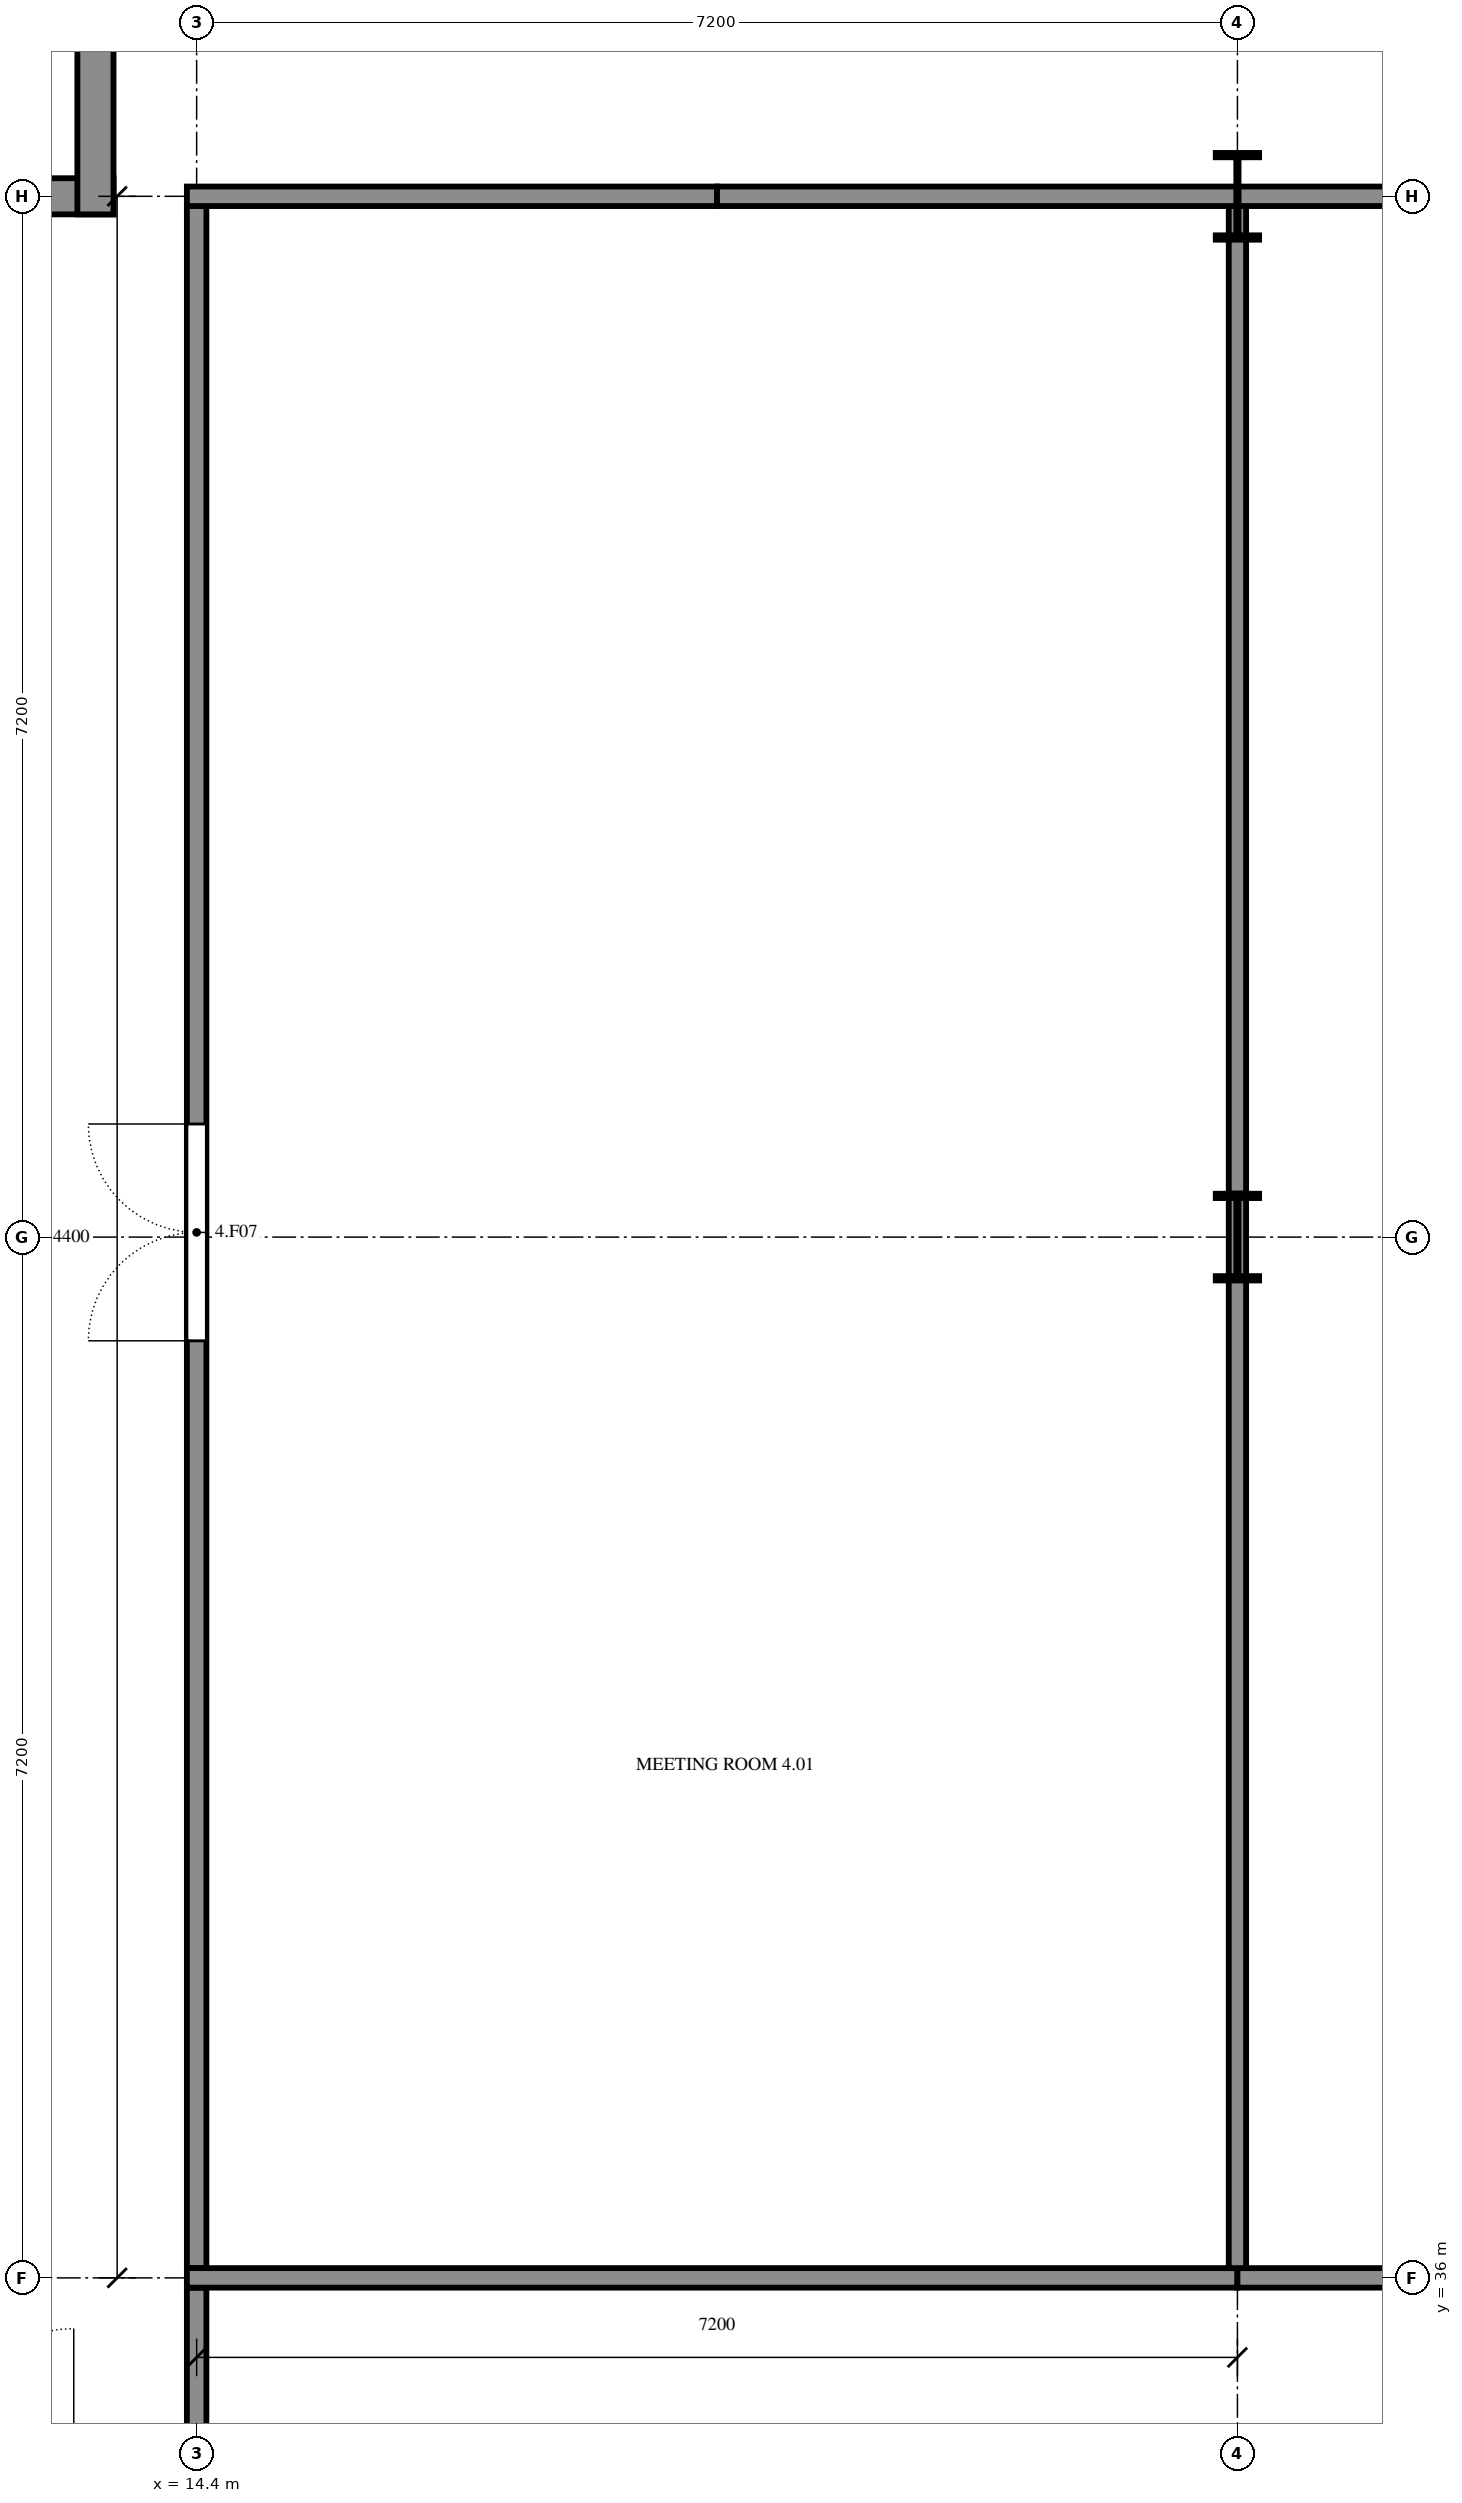
"""IFC4 building model, lengths in metres.
Left out: names, types, materials, properties, quantities, classifications, styles, units other than length and angle.
Written with IfcOpenShell. Run it as: python <this file> out.ifc"""

import sys

from ifc_helpers import new_model, si_unit, direction, frame, frame_2d, origin, origin_2d, place, context, subcontext, project, spatial, rectangle, i_section, extrude, element, fill, save


model = new_model("IFC4")
c1 = context("Model", 3, precision=1e-05, world=origin(), true_north=direction((0.0, 1.0)))
c2 = subcontext(c1, "Body", "Model", "MODEL_VIEW")
j1 = project(units=[si_unit("LENGTHUNIT", "METRE"), si_unit("PLANEANGLEUNIT", "RADIAN")], contexts=[c1])
p1 = place(None, origin())
s1 = spatial("IfcSite", under=j1, at=p1, CompositionType="ELEMENT")
p2 = place(p1, origin())
s2 = spatial("IfcBuilding", under=s1, at=p2, CompositionType="ELEMENT")
p3 = place(p2, frame((0.0, 0.0, 14.4)))
s3 = spatial("IfcBuildingStorey", under=s2, at=p3, CompositionType="ELEMENT", Elevation=14.4)
for number, where, z_axis, x_axis in (
    (1, (21.6, 43.2, 0.0), (0.0, 0.0, 1.0), (1.0, 0.0, 0.0)),
    (2, (21.6, 50.4, 0.0), (0.0, 0.0, 1.0), (1.0, 0.0, 0.0)),
):
    element("IfcColumn", number, at=place(p3, frame(where, z_axis=z_axis, x_axis=x_axis)), inside=s3, PredefinedType="COLUMN", context=c2, shape_type="SweptSolid", body=[
        extrude(i_section(OverallWidth=0.3, OverallDepth=0.6, WebThickness=0.015, FlangeThickness=0.03, FilletRadius=0.027, at=origin_2d()), origin(), (0.0, 0.0, 1.0), 3.6),
    ])
p4 = place(p3, frame((11.725, 50.4, 0.0), z_axis=(0.0, 0.0, 1.0), x_axis=(1.0, 0.0, 0.0)))
e3 = element("IfcWall", 3, at=p4, inside=s3, PredefinedType="SHEAR", context=c2, shape_type="SweptSolid", body=[
    extrude(rectangle(XDim=2.1, YDim=0.25, at=frame_2d((1.05, 0.0))), origin(), (0.0, 0.0, 1.0), 3.6),
])
p5 = place(p3, frame((13.7, 50.275, 0.0), z_axis=(0.0, 0.0, 1.0), x_axis=(0.0, 1.0, 0.0)))
e4 = element("IfcWall", 4, at=p5, inside=s3, PredefinedType="SHEAR", context=c2, shape_type="SweptSolid", body=[
    extrude(rectangle(XDim=5.25, YDim=0.25, at=frame_2d((2.625, 0.0))), origin(), (0.0, 0.0, 1.0), 3.6),
])
p6 = place(p5, frame((1.975, 0.0, 0.0)))
e5 = element("IfcOpeningElement", 5, at=p6, cuts=e4, PredefinedType="OPENING", context=c2, shape_type="SweptSolid", body=[
    extrude(rectangle(XDim=1.2, YDim=2.4, at=frame_2d((0.6, 1.2))), frame((0.0, 0.135, 0.0), z_axis=(0.0, -1.0, 0.0), x_axis=(1.0, 0.0, 0.0)), (0.0, 0.0, 1.0), 0.27),
])
p7 = place(p3, frame((14.4, 50.333, 0.0), z_axis=(0.0, 0.0, 1.0), x_axis=(0.0, -1.0, 0.0)))
e6 = element("IfcWall", 6, at=p7, inside=s3, PredefinedType="PARTITIONING", context=c2, shape_type="SweptSolid", body=[
    extrude(rectangle(XDim=14.265, YDim=0.135, at=frame_2d((7.133, 0.0))), origin(), (0.0, 0.0, 1.0), 3.12),
])
p8 = place(p7, frame((6.35, 0.0, 0.0)))
e7 = element("IfcOpeningElement", 7, at=p8, cuts=e6, PredefinedType="OPENING", context=c2, shape_type="SweptSolid", body=[
    extrude(rectangle(XDim=1.5, YDim=2.1, at=frame_2d((0.75, 1.05))), frame((0.0, 0.077, 0.0), z_axis=(0.0, -1.0, 0.0), x_axis=(1.0, 0.0, 0.0)), (0.0, 0.0, 1.0), 0.155),
])
p9 = place(p3, frame((14.4, 35.933, 0.0), z_axis=(0.0, 0.0, 1.0), x_axis=(0.0, -1.0, 0.0)))
e8 = element("IfcWall", 8, at=p9, inside=s3, PredefinedType="PARTITIONING", context=c2, shape_type="SweptSolid", body=[
    extrude(rectangle(XDim=0.973, YDim=0.135, at=frame_2d((0.486, 0.0))), origin(), (0.0, 0.0, 1.0), 3.219),
])
p10 = place(p3, frame((18.0, 50.4, 0.0), z_axis=(0.0, 0.0, 1.0), x_axis=(-1.0, 0.0, 0.0)))
e9 = element("IfcWall", 9, at=p10, inside=s3, PredefinedType="PARTITIONING", context=c2, shape_type="SweptSolid", body=[
    extrude(rectangle(XDim=3.667, YDim=0.135, at=frame_2d((1.834, 0.0))), origin(), (0.0, 0.0, 1.0), 3.09),
])
p11 = place(p3, frame((21.6, 50.333, 0.0), z_axis=(0.0, 0.0, 1.0), x_axis=(0.0, -1.0, 0.0)))
e10 = element("IfcWall", 10, at=p11, inside=s3, PredefinedType="MOVABLE", context=c2, shape_type="SweptSolid", body=[
    extrude(rectangle(XDim=6.833, YDim=0.12, at=frame_2d((3.416, 0.0))), origin(), (0.0, 0.0, 1.0), 3.12),
])
p12 = place(p3, frame((21.6, 36.0, 0.0), z_axis=(0.0, 0.0, 1.0), x_axis=(-1.0, 0.0, 0.0)))
e11 = element("IfcWall", 11, at=p12, inside=s3, PredefinedType="PARTITIONING", context=c2, shape_type="SweptSolid", body=[
    extrude(rectangle(XDim=7.268, YDim=0.135, at=frame_2d((3.634, 0.0))), origin(), (0.0, 0.0, 1.0), 2.82),
])
p13 = place(p3, frame((18.0, 50.4, 0.0), z_axis=(0.0, 0.0, 1.0), x_axis=(1.0, 0.0, 0.0)))
e12 = element("IfcWall", 12, at=p13, inside=s3, PredefinedType="PARTITIONING", context=c2, shape_type="SweptSolid", body=[
    extrude(rectangle(XDim=3.6, YDim=0.135, at=frame_2d((1.8, 0.0))), origin(), (0.0, 0.0, 1.0), 3.09),
])
p14 = place(p3, frame((28.8, 36.0, 0.0), z_axis=(0.0, 0.0, 1.0), x_axis=(-1.0, 0.0, 0.0)))
e13 = element("IfcWall", 13, at=p14, inside=s3, PredefinedType="PARTITIONING", context=c2, shape_type="SweptSolid", body=[
    extrude(rectangle(XDim=7.2, YDim=0.135, at=frame_2d((3.6, 0.0))), origin(), (0.0, 0.0, 1.0), 2.82),
])
p15 = place(p3, frame((21.6, 50.4, 0.0), z_axis=(0.0, 0.0, 1.0), x_axis=(1.0, 0.0, 0.0)))
e14 = element("IfcWall", 14, at=p15, inside=s3, PredefinedType="PARTITIONING", context=c2, shape_type="SweptSolid", body=[
    extrude(rectangle(XDim=7.2, YDim=0.135, at=frame_2d((3.6, 0.0))), origin(), (0.0, 0.0, 1.0), 2.82),
])
p16 = place(p15, frame((2.85, 0.0, 0.0)))
e15 = element("IfcOpeningElement", 15, at=p16, cuts=e14, PredefinedType="OPENING", context=c2, shape_type="SweptSolid", body=[
    extrude(rectangle(XDim=1.5, YDim=2.1, at=frame_2d((0.75, 1.05))), frame((0.0, 0.077, 0.0), z_axis=(0.0, -1.0, 0.0), x_axis=(1.0, 0.0, 0.0)), (0.0, 0.0, 1.0), 0.155),
])
p17 = place(p3, frame((21.6, 43.5, 0.0), z_axis=(0.0, 0.0, 1.0), x_axis=(0.0, -1.0, 0.0)))
e16 = element("IfcWall", 16, at=p17, inside=s3, PredefinedType="MOVABLE", context=c2, shape_type="SweptSolid", body=[
    extrude(rectangle(XDim=7.433, YDim=0.12, at=frame_2d((3.716, 0.0))), origin(), (0.0, 0.0, 1.0), 2.82),
])
p18 = place(p8, frame((1.5, 0.0, 0.0), z_axis=(0.0, 0.0, 1.0), x_axis=(-1.0, 0.0, 0.0)))
e17 = element("IfcDoor", 17, at=p18, inside=s3, OperationType="DOUBLE_DOOR_SINGLE_SWING", PredefinedType="DOOR", context=c2, shape_type="SweptSolid", body=[
    extrude(rectangle(XDim=1.5, YDim=2.1, at=frame_2d((0.75, 1.05))), frame((0.0, 0.025, 0.0), z_axis=(0.0, -1.0, 0.0), x_axis=(1.0, 0.0, 0.0)), (0.0, 0.0, 1.0), 0.05),
])
fill(e7, e17)
save(model, sys.argv[1])
